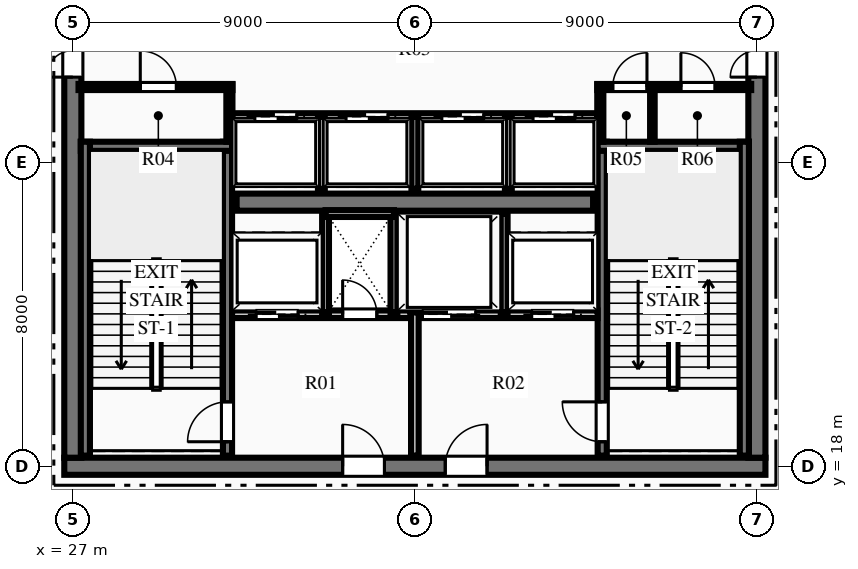
"""IFC4 building model, lengths in metres.
Left out: names, types, materials, properties, quantities, classifications, styles, units other than length and angle.
Written with IfcOpenShell. Run it as: python <this file> out.ifc"""

import sys

from ifc_helpers import new_model, si_unit, direction, frame, frame_2d, origin, place, context, subcontext, project, spatial, rectangle, extrude, element, fill, save


model = new_model("IFC4")
c1 = context("Model", 3, precision=1e-05, world=origin(), true_north=direction((0.0, 1.0)))
c2 = subcontext(c1, "Body", "Model", "MODEL_VIEW")
j1 = project(units=[si_unit("LENGTHUNIT", "METRE"), si_unit("PLANEANGLEUNIT", "RADIAN")], contexts=[c1])
p1 = place(None, origin())
s1 = spatial("IfcSite", under=j1, at=p1, CompositionType="ELEMENT")
p2 = place(p1, origin())
s2 = spatial("IfcBuilding", under=s1, at=p2, CompositionType="ELEMENT")
p3 = place(p2, frame((0.0, 0.0, 244.2)))
s3 = spatial("IfcBuildingStorey", under=s2, at=p3, CompositionType="ELEMENT", Elevation=244.2)
p4 = place(p3, frame((26.775, 18.0, 0.0), z_axis=(0.0, 0.0, 1.0), x_axis=(1.0, 0.0, 0.0)))
e1 = element("IfcWall", 1, at=p4, inside=s3, PredefinedType="SHEAR", context=c2, shape_type="SweptSolid", body=[
    extrude(rectangle(XDim=18.45, YDim=0.45, at=frame_2d((9.225, 0.0))), origin(), (0.0, 0.0, 1.0), 4.5),
])
p5 = place(p4, frame((7.325, 0.0, 0.0)))
e2 = element("IfcOpeningElement", 2, at=p5, cuts=e1, PredefinedType="OPENING", context=c2, shape_type="SweptSolid", body=[
    extrude(rectangle(XDim=1.1, YDim=2.15, at=frame_2d((0.55, 1.075))), frame((0.0, 0.235, 0.0), z_axis=(0.0, -1.0, 0.0), x_axis=(1.0, 0.0, 0.0)), (0.0, 0.0, 1.0), 0.47),
])
p6 = place(p4, frame((10.025, 0.0, 0.0)))
e3 = element("IfcOpeningElement", 3, at=p6, cuts=e1, PredefinedType="OPENING", context=c2, shape_type="SweptSolid", body=[
    extrude(rectangle(XDim=1.1, YDim=2.15, at=frame_2d((0.55, 1.075))), frame((0.0, 0.235, 0.0), z_axis=(0.0, -1.0, 0.0), x_axis=(1.0, 0.0, 0.0)), (0.0, 0.0, 1.0), 0.47),
])
p7 = place(p3, frame((27.0, 18.225, 0.0), z_axis=(0.0, 0.0, 1.0), x_axis=(0.0, 1.0, 0.0)))
e4 = element("IfcWall", 4, at=p7, inside=s3, PredefinedType="SHEAR", context=c2, shape_type="SweptSolid", body=[
    extrude(rectangle(XDim=15.55, YDim=0.45, at=frame_2d((7.775, 0.0))), origin(), (0.0, 0.0, 1.0), 4.5),
])
p8 = place(p7, frame((10.015, 0.0, 0.0)))
e5 = element("IfcOpeningElement", 5, at=p8, cuts=e4, PredefinedType="OPENING", context=c2, shape_type="SweptSolid", body=[
    extrude(rectangle(XDim=1.4, YDim=2.2, at=frame_2d((0.7, 1.1))), frame((0.0, 0.235, 0.0), z_axis=(0.0, -1.0, 0.0), x_axis=(1.0, 0.0, 0.0)), (0.0, 0.0, 1.0), 0.47),
])
p9 = place(p3, frame((45.0, 18.225, 0.0), z_axis=(0.0, 0.0, 1.0), x_axis=(0.0, 1.0, 0.0)))
e6 = element("IfcWall", 6, at=p9, inside=s3, PredefinedType="SHEAR", context=c2, shape_type="SweptSolid", body=[
    extrude(rectangle(XDim=15.55, YDim=0.45, at=frame_2d((7.775, 0.0))), origin(), (0.0, 0.0, 1.0), 4.5),
])
p10 = place(p9, frame((10.015, 0.0, 0.0)))
e7 = element("IfcOpeningElement", 7, at=p10, cuts=e6, PredefinedType="OPENING", context=c2, shape_type="SweptSolid", body=[
    extrude(rectangle(XDim=1.4, YDim=2.2, at=frame_2d((0.7, 1.1))), frame((0.0, 0.235, 0.0), z_axis=(0.0, -1.0, 0.0), x_axis=(1.0, 0.0, 0.0)), (0.0, 0.0, 1.0), 0.47),
])
p11 = place(p3, frame((31.31, 24.95, 0.0), z_axis=(0.0, 0.0, 1.0), x_axis=(1.0, 0.0, 0.0)))
e8 = element("IfcWall", 8, at=p11, inside=s3, PredefinedType="SHEAR", context=c2, shape_type="SweptSolid", body=[
    extrude(rectangle(XDim=9.38, YDim=0.45, at=frame_2d((4.69, 0.0))), origin(), (0.0, 0.0, 1.0), 4.5),
])
p12 = place(p3, frame((31.07, 18.28, 0.0), z_axis=(0.0, 0.0, 1.0), x_axis=(0.0, 1.0, 0.0)))
e9 = element("IfcWall", 9, at=p12, inside=s3, PredefinedType="SHEAR", context=c2, shape_type="SweptSolid", body=[
    extrude(rectangle(XDim=8.26, YDim=0.24, at=frame_2d((4.13, 0.0))), origin(), (0.0, 0.0, 1.0), 4.5),
])
p13 = place(p12, frame((0.365, 0.0, 0.0)))
e10 = element("IfcOpeningElement", 10, at=p13, cuts=e9, PredefinedType="OPENING", context=c2, shape_type="SweptSolid", body=[
    extrude(rectangle(XDim=1.05, YDim=2.15, at=frame_2d((0.525, 1.075))), frame((0.0, 0.13, 0.0), z_axis=(0.0, -1.0, 0.0), x_axis=(1.0, 0.0, 0.0)), (0.0, 0.0, 1.0), 0.26),
])
p14 = place(p3, frame((27.21, 26.42, 0.0), z_axis=(0.0, 0.0, 1.0), x_axis=(1.0, 0.0, 0.0)))
e11 = element("IfcWall", 11, at=p14, inside=s3, PredefinedType="SHEAR", context=c2, shape_type="SweptSolid", body=[
    extrude(rectangle(XDim=3.98, YDim=0.24, at=frame_2d((1.99, 0.0))), origin(), (0.0, 0.0, 1.0), 4.5),
])
p15 = place(p3, frame((27.33, 18.28, 0.0), z_axis=(0.0, 0.0, 1.0), x_axis=(0.0, 1.0, 0.0)))
e12 = element("IfcWall", 12, at=p15, inside=s3, PredefinedType="SHEAR", context=c2, shape_type="SweptSolid", body=[
    extrude(rectangle(XDim=8.26, YDim=0.24, at=frame_2d((4.13, 0.0))), origin(), (0.0, 0.0, 1.0), 4.5),
])
p16 = place(p3, frame((40.93, 18.28, 0.0), z_axis=(0.0, 0.0, 1.0), x_axis=(0.0, 1.0, 0.0)))
e13 = element("IfcWall", 13, at=p16, inside=s3, PredefinedType="SHEAR", context=c2, shape_type="SweptSolid", body=[
    extrude(rectangle(XDim=8.26, YDim=0.24, at=frame_2d((4.13, 0.0))), origin(), (0.0, 0.0, 1.0), 4.5),
])
p17 = place(p16, frame((0.365, 0.0, 0.0)))
e14 = element("IfcOpeningElement", 14, at=p17, cuts=e13, PredefinedType="OPENING", context=c2, shape_type="SweptSolid", body=[
    extrude(rectangle(XDim=1.05, YDim=2.15, at=frame_2d((0.525, 1.075))), frame((0.0, 0.13, 0.0), z_axis=(0.0, -1.0, 0.0), x_axis=(1.0, 0.0, 0.0)), (0.0, 0.0, 1.0), 0.26),
])
p18 = place(p3, frame((40.81, 26.42, 0.0), z_axis=(0.0, 0.0, 1.0), x_axis=(1.0, 0.0, 0.0)))
e15 = element("IfcWall", 15, at=p18, inside=s3, PredefinedType="SHEAR", context=c2, shape_type="SweptSolid", body=[
    extrude(rectangle(XDim=3.98, YDim=0.24, at=frame_2d((1.99, 0.0))), origin(), (0.0, 0.0, 1.0), 4.5),
])
p19 = place(p3, frame((44.67, 18.28, 0.0), z_axis=(0.0, 0.0, 1.0), x_axis=(0.0, 1.0, 0.0)))
e16 = element("IfcWall", 16, at=p19, inside=s3, PredefinedType="SHEAR", context=c2, shape_type="SweptSolid", body=[
    extrude(rectangle(XDim=8.26, YDim=0.24, at=frame_2d((4.13, 0.0))), origin(), (0.0, 0.0, 1.0), 4.5),
])
p20 = place(p3, frame((36.0, 18.28, 0.0), z_axis=(0.0, 0.0, 1.0), x_axis=(0.0, 1.0, 0.0)))
e17 = element("IfcWall", 17, at=p20, inside=s3, PredefinedType="PARTITIONING", context=c2, shape_type="SweptSolid", body=[
    extrude(rectangle(XDim=3.77, YDim=0.2, at=frame_2d((1.885, 0.0))), origin(), (0.0, 0.0, 1.0), 4.23),
])
p21 = place(p3, frame((31.19, 22.0, 0.0), z_axis=(0.0, 0.0, 1.0), x_axis=(1.0, 0.0, 0.0)))
e18 = element("IfcWall", 18, at=p21, inside=s3, PredefinedType="PARTITIONING", context=c2, shape_type="SweptSolid", body=[
    extrude(rectangle(XDim=4.69, YDim=0.2, at=frame_2d((2.345, 0.0))), origin(), (0.0, 0.0, 1.0), 4.23),
])
p22 = place(p21, frame((2.91, 0.0, 0.0)))
e19 = element("IfcOpeningElement", 19, at=p22, cuts=e18, PredefinedType="OPENING", context=c2, shape_type="SweptSolid", body=[
    extrude(rectangle(XDim=0.9, YDim=2.15, at=frame_2d((0.45, 1.075))), frame((0.0, 0.11, 0.0), z_axis=(0.0, -1.0, 0.0), x_axis=(1.0, 0.0, 0.0)), (0.0, 0.0, 1.0), 0.22),
])
p23 = place(p21, frame((0.635, 0.0, 0.0)))
e20 = element("IfcOpeningElement", 20, at=p23, cuts=e18, PredefinedType="OPENING", context=c2, shape_type="SweptSolid", body=[
    extrude(rectangle(XDim=1.1, YDim=2.15, at=frame_2d((0.55, 1.075))), frame((0.0, 0.11, 0.0), z_axis=(0.0, -1.0, 0.0), x_axis=(1.0, 0.0, 0.0)), (0.0, 0.0, 1.0), 0.22),
])
p24 = place(p3, frame((36.12, 22.0, 0.0), z_axis=(0.0, 0.0, 1.0), x_axis=(1.0, 0.0, 0.0)))
e21 = element("IfcWall", 21, at=p24, inside=s3, PredefinedType="PARTITIONING", context=c2, shape_type="SweptSolid", body=[
    extrude(rectangle(XDim=4.69, YDim=0.2, at=frame_2d((2.345, 0.0))), origin(), (0.0, 0.0, 1.0), 4.23),
])
p25 = place(p24, frame((2.955, 0.0, 0.0)))
e22 = element("IfcOpeningElement", 22, at=p25, cuts=e21, PredefinedType="OPENING", context=c2, shape_type="SweptSolid", body=[
    extrude(rectangle(XDim=1.1, YDim=2.15, at=frame_2d((0.55, 1.075))), frame((0.0, 0.11, 0.0), z_axis=(0.0, -1.0, 0.0), x_axis=(1.0, 0.0, 0.0)), (0.0, 0.0, 1.0), 0.22),
])
p26 = place(p24, frame((0.08, 0.0, 0.0)))
e23 = element("IfcOpeningElement", 23, at=p26, cuts=e21, PredefinedType="OPENING", context=c2, shape_type="SweptSolid", body=[
    extrude(rectangle(XDim=1.4, YDim=2.2, at=frame_2d((0.7, 1.1))), frame((0.0, 0.11, 0.0), z_axis=(0.0, -1.0, 0.0), x_axis=(1.0, 0.0, 0.0)), (0.0, 0.0, 1.0), 0.22),
])
for number, where, z_axis, x_axis in (
    (24, (33.65, 22.05, 0.0), (0.0, 0.0, 1.0), (0.0, 1.0, 0.0)),
    (25, (35.45, 22.05, 0.0), (0.0, 0.0, 1.0), (0.0, 1.0, 0.0)),
):
    element("IfcWall", number, at=place(p3, frame(where, z_axis=z_axis, x_axis=x_axis)), inside=s3, PredefinedType="PARTITIONING", context=c2, shape_type="SweptSolid", body=[
        extrude(rectangle(XDim=2.6, YDim=0.18, at=frame_2d((1.3, 0.0))), origin(), (0.0, 0.0, 1.0), 4.23),
    ])
p27 = place(p3, frame((33.65, 24.65, 0.0), z_axis=(0.0, 0.0, 1.0), x_axis=(1.0, 0.0, 0.0)))
e26 = element("IfcWall", 26, at=p27, inside=s3, PredefinedType="PARTITIONING", context=c2, shape_type="SweptSolid", body=[
    extrude(rectangle(XDim=1.8, YDim=0.18, at=frame_2d((0.9, 0.0))), origin(), (0.0, 0.0, 1.0), 4.23),
])
p28 = place(p3, frame((38.35, 22.05, 0.0), z_axis=(0.0, 0.0, 1.0), x_axis=(0.0, 1.0, 0.0)))
e27 = element("IfcWall", 27, at=p28, inside=s3, PredefinedType="PARTITIONING", context=c2, shape_type="SweptSolid", body=[
    extrude(rectangle(XDim=2.6, YDim=0.18, at=frame_2d((1.3, 0.0))), origin(), (0.0, 0.0, 1.0), 4.23),
])
p29 = place(p3, frame((27.15, 27.98, 0.0), z_axis=(0.0, 0.0, 1.0), x_axis=(1.0, 0.0, 0.0)))
e28 = element("IfcWall", 28, at=p29, inside=s3, PredefinedType="PARTITIONING", context=c2, shape_type="SweptSolid", body=[
    extrude(rectangle(XDim=4.05, YDim=0.16, at=frame_2d((2.025, 0.0))), origin(), (0.0, 0.0, 1.0), 4.23),
])
p30 = place(p29, frame((1.625, 0.0, 0.0)))
e29 = element("IfcOpeningElement", 29, at=p30, cuts=e28, PredefinedType="OPENING", context=c2, shape_type="SweptSolid", body=[
    extrude(rectangle(XDim=0.95, YDim=2.15, at=frame_2d((0.475, 1.075))), frame((0.0, 0.09, 0.0), z_axis=(0.0, -1.0, 0.0), x_axis=(1.0, 0.0, 0.0)), (0.0, 0.0, 1.0), 0.18),
])
p31 = place(p3, frame((31.12, 26.54, 0.0), z_axis=(0.0, 0.0, 1.0), x_axis=(0.0, 1.0, 0.0)))
e30 = element("IfcWall", 30, at=p31, inside=s3, PredefinedType="PARTITIONING", context=c2, shape_type="SweptSolid", body=[
    extrude(rectangle(XDim=1.51, YDim=0.16, at=frame_2d((0.755, 0.0))), origin(), (0.0, 0.0, 1.0), 4.23),
])
p32 = place(p3, frame((40.8, 27.98, 0.0), z_axis=(0.0, 0.0, 1.0), x_axis=(1.0, 0.0, 0.0)))
e31 = element("IfcWall", 31, at=p32, inside=s3, PredefinedType="PARTITIONING", context=c2, shape_type="SweptSolid", body=[
    extrude(rectangle(XDim=4.05, YDim=0.16, at=frame_2d((2.025, 0.0))), origin(), (0.0, 0.0, 1.0), 4.23),
])
p33 = place(p32, frame((0.407, 0.0, 0.0)))
e32 = element("IfcOpeningElement", 32, at=p33, cuts=e31, PredefinedType="OPENING", context=c2, shape_type="SweptSolid", body=[
    extrude(rectangle(XDim=0.9, YDim=2.15, at=frame_2d((0.45, 1.075))), frame((0.0, 0.09, 0.0), z_axis=(0.0, -1.0, 0.0), x_axis=(1.0, 0.0, 0.0)), (0.0, 0.0, 1.0), 0.18),
])
p34 = place(p32, frame((2.2, 0.0, 0.0)))
e33 = element("IfcOpeningElement", 33, at=p34, cuts=e31, PredefinedType="OPENING", context=c2, shape_type="SweptSolid", body=[
    extrude(rectangle(XDim=0.9, YDim=2.15, at=frame_2d((0.45, 1.075))), frame((0.0, 0.09, 0.0), z_axis=(0.0, -1.0, 0.0), x_axis=(1.0, 0.0, 0.0)), (0.0, 0.0, 1.0), 0.18),
])
p35 = place(p3, frame((40.88, 26.54, 0.0), z_axis=(0.0, 0.0, 1.0), x_axis=(0.0, 1.0, 0.0)))
e34 = element("IfcWall", 34, at=p35, inside=s3, PredefinedType="PARTITIONING", context=c2, shape_type="SweptSolid", body=[
    extrude(rectangle(XDim=1.51, YDim=0.16, at=frame_2d((0.755, 0.0))), origin(), (0.0, 0.0, 1.0), 4.23),
])
p36 = place(p3, frame((42.25, 26.54, 0.0), z_axis=(0.0, 0.0, 1.0), x_axis=(0.0, 1.0, 0.0)))
e35 = element("IfcWall", 35, at=p36, inside=s3, PredefinedType="PARTITIONING", context=c2, shape_type="SweptSolid", body=[
    extrude(rectangle(XDim=1.44, YDim=0.12, at=frame_2d((0.72, 0.0))), origin(), (0.0, 0.0, 1.0), 4.23),
])
p37 = place(p3, frame((31.2, 27.2, 0.0), z_axis=(0.0, 0.0, 1.0), x_axis=(1.0, 0.0, 0.0)))
e36 = element("IfcWall", 36, at=p37, inside=s3, PredefinedType="PARTITIONING", context=c2, shape_type="SweptSolid", body=[
    extrude(rectangle(XDim=9.6, YDim=0.18, at=frame_2d((4.8, 0.0))), origin(), (0.0, 0.0, 1.0), 4.23),
])
p38 = place(p37, frame((0.59, 0.0, 0.0)))
e37 = element("IfcOpeningElement", 37, at=p38, cuts=e36, PredefinedType="OPENING", context=c2, shape_type="SweptSolid", body=[
    extrude(rectangle(XDim=1.1, YDim=2.15, at=frame_2d((0.55, 1.075))), frame((0.0, 0.1, 0.0), z_axis=(0.0, -1.0, 0.0), x_axis=(1.0, 0.0, 0.0)), (0.0, 0.0, 1.0), 0.2),
])
p39 = place(p37, frame((2.99, 0.0, 0.0)))
e38 = element("IfcOpeningElement", 38, at=p39, cuts=e36, PredefinedType="OPENING", context=c2, shape_type="SweptSolid", body=[
    extrude(rectangle(XDim=1.1, YDim=2.15, at=frame_2d((0.55, 1.075))), frame((0.0, 0.1, 0.0), z_axis=(0.0, -1.0, 0.0), x_axis=(1.0, 0.0, 0.0)), (0.0, 0.0, 1.0), 0.2),
])
p40 = place(p37, frame((5.51, 0.0, 0.0)))
e39 = element("IfcOpeningElement", 39, at=p40, cuts=e36, PredefinedType="OPENING", context=c2, shape_type="SweptSolid", body=[
    extrude(rectangle(XDim=1.1, YDim=2.15, at=frame_2d((0.55, 1.075))), frame((0.0, 0.1, 0.0), z_axis=(0.0, -1.0, 0.0), x_axis=(1.0, 0.0, 0.0)), (0.0, 0.0, 1.0), 0.2),
])
p41 = place(p37, frame((7.91, 0.0, 0.0)))
e40 = element("IfcOpeningElement", 40, at=p41, cuts=e36, PredefinedType="OPENING", context=c2, shape_type="SweptSolid", body=[
    extrude(rectangle(XDim=1.1, YDim=2.15, at=frame_2d((0.55, 1.075))), frame((0.0, 0.1, 0.0), z_axis=(0.0, -1.0, 0.0), x_axis=(1.0, 0.0, 0.0)), (0.0, 0.0, 1.0), 0.2),
])
for number, where, z_axis, x_axis in (
    (41, (33.54, 25.3, 0.0), (0.0, 0.0, 1.0), (0.0, 1.0, 0.0)),
    (42, (36.0, 25.3, 0.0), (0.0, 0.0, 1.0), (0.0, 1.0, 0.0)),
    (43, (38.46, 25.3, 0.0), (0.0, 0.0, 1.0), (0.0, 1.0, 0.0)),
):
    element("IfcWall", number, at=place(p3, frame(where, z_axis=z_axis, x_axis=x_axis)), inside=s3, PredefinedType="PARTITIONING", context=c2, shape_type="SweptSolid", body=[
        extrude(rectangle(XDim=1.9, YDim=0.18, at=frame_2d((0.95, 0.0))), origin(), (0.0, 0.0, 1.0), 4.23),
    ])
p42 = place(p30, origin())
e44 = element("IfcDoor", 44, at=p42, inside=s3, OperationType="SINGLE_SWING_LEFT", PredefinedType="DOOR", context=c2, shape_type="SweptSolid", body=[
    extrude(rectangle(XDim=0.95, YDim=2.15, at=frame_2d((0.475, 1.075))), frame((0.0, 0.025, 0.0), z_axis=(0.0, -1.0, 0.0), x_axis=(1.0, 0.0, 0.0)), (0.0, 0.0, 1.0), 0.05),
])
fill(e29, e44)
p43 = place(p33, origin())
e45 = element("IfcDoor", 45, at=p43, inside=s3, OperationType="SINGLE_SWING_RIGHT", PredefinedType="DOOR", context=c2, shape_type="SweptSolid", body=[
    extrude(rectangle(XDim=0.9, YDim=2.15, at=frame_2d((0.45, 1.075))), frame((0.0, 0.025, 0.0), z_axis=(0.0, -1.0, 0.0), x_axis=(1.0, 0.0, 0.0)), (0.0, 0.0, 1.0), 0.05),
])
fill(e32, e45)
p44 = place(p34, origin())
e46 = element("IfcDoor", 46, at=p44, inside=s3, OperationType="SINGLE_SWING_LEFT", PredefinedType="DOOR", context=c2, shape_type="SweptSolid", body=[
    extrude(rectangle(XDim=0.9, YDim=2.15, at=frame_2d((0.45, 1.075))), frame((0.0, 0.025, 0.0), z_axis=(0.0, -1.0, 0.0), x_axis=(1.0, 0.0, 0.0)), (0.0, 0.0, 1.0), 0.05),
])
fill(e33, e46)
p45 = place(p13, origin())
e47 = element("IfcDoor", 47, at=p45, inside=s3, OperationType="SINGLE_SWING_LEFT", PredefinedType="DOOR", context=c2, shape_type="SweptSolid", body=[
    extrude(rectangle(XDim=1.05, YDim=2.15, at=frame_2d((0.525, 1.075))), frame((0.0, 0.025, 0.0), z_axis=(0.0, -1.0, 0.0), x_axis=(1.0, 0.0, 0.0)), (0.0, 0.0, 1.0), 0.05),
])
fill(e10, e47)
p46 = place(p17, origin())
e48 = element("IfcDoor", 48, at=p46, inside=s3, OperationType="SINGLE_SWING_RIGHT", PredefinedType="DOOR", context=c2, shape_type="SweptSolid", body=[
    extrude(rectangle(XDim=1.05, YDim=2.15, at=frame_2d((0.525, 1.075))), frame((0.0, 0.025, 0.0), z_axis=(0.0, -1.0, 0.0), x_axis=(1.0, 0.0, 0.0)), (0.0, 0.0, 1.0), 0.05),
])
fill(e14, e48)
p47 = place(p5, origin())
e49 = element("IfcDoor", 49, at=p47, inside=s3, OperationType="SINGLE_SWING_LEFT", PredefinedType="DOOR", context=c2, shape_type="SweptSolid", body=[
    extrude(rectangle(XDim=1.1, YDim=2.15, at=frame_2d((0.55, 1.075))), frame((0.0, 0.025, 0.0), z_axis=(0.0, -1.0, 0.0), x_axis=(1.0, 0.0, 0.0)), (0.0, 0.0, 1.0), 0.05),
])
fill(e2, e49)
p48 = place(p6, origin())
e50 = element("IfcDoor", 50, at=p48, inside=s3, OperationType="SINGLE_SWING_RIGHT", PredefinedType="DOOR", context=c2, shape_type="SweptSolid", body=[
    extrude(rectangle(XDim=1.1, YDim=2.15, at=frame_2d((0.55, 1.075))), frame((0.0, 0.025, 0.0), z_axis=(0.0, -1.0, 0.0), x_axis=(1.0, 0.0, 0.0)), (0.0, 0.0, 1.0), 0.05),
])
fill(e3, e50)
p49 = place(p22, origin())
e51 = element("IfcDoor", 51, at=p49, inside=s3, OperationType="SINGLE_SWING_LEFT", PredefinedType="DOOR", context=c2, shape_type="SweptSolid", body=[
    extrude(rectangle(XDim=0.9, YDim=2.15, at=frame_2d((0.45, 1.075))), frame((0.0, 0.025, 0.0), z_axis=(0.0, -1.0, 0.0), x_axis=(1.0, 0.0, 0.0)), (0.0, 0.0, 1.0), 0.05),
])
fill(e19, e51)
p50 = place(p8, origin())
e52 = element("IfcDoor", 52, at=p50, inside=s3, OperationType="DOUBLE_DOOR_SINGLE_SWING", PredefinedType="DOOR", context=c2, shape_type="SweptSolid", body=[
    extrude(rectangle(XDim=1.4, YDim=2.2, at=frame_2d((0.7, 1.1))), frame((0.0, 0.025, 0.0), z_axis=(0.0, -1.0, 0.0), x_axis=(1.0, 0.0, 0.0)), (0.0, 0.0, 1.0), 0.05),
])
fill(e5, e52)
p51 = place(p10, origin())
e53 = element("IfcDoor", 53, at=p51, inside=s3, OperationType="DOUBLE_DOOR_SINGLE_SWING", PredefinedType="DOOR", context=c2, shape_type="SweptSolid", body=[
    extrude(rectangle(XDim=1.4, YDim=2.2, at=frame_2d((0.7, 1.1))), frame((0.0, 0.025, 0.0), z_axis=(0.0, -1.0, 0.0), x_axis=(1.0, 0.0, 0.0)), (0.0, 0.0, 1.0), 0.05),
])
fill(e7, e53)
p52 = place(p38, origin())
e54 = element("IfcDoor", 54, at=p52, inside=s3, OperationType="SLIDING_TO_LEFT", PredefinedType="DOOR", context=c2, shape_type="SweptSolid", body=[
    extrude(rectangle(XDim=1.1, YDim=2.15, at=frame_2d((0.55, 1.075))), frame((0.0, 0.025, 0.0), z_axis=(0.0, -1.0, 0.0), x_axis=(1.0, 0.0, 0.0)), (0.0, 0.0, 1.0), 0.05),
])
fill(e37, e54)
p53 = place(p39, origin())
e55 = element("IfcDoor", 55, at=p53, inside=s3, OperationType="SLIDING_TO_LEFT", PredefinedType="DOOR", context=c2, shape_type="SweptSolid", body=[
    extrude(rectangle(XDim=1.1, YDim=2.15, at=frame_2d((0.55, 1.075))), frame((0.0, 0.025, 0.0), z_axis=(0.0, -1.0, 0.0), x_axis=(1.0, 0.0, 0.0)), (0.0, 0.0, 1.0), 0.05),
])
fill(e38, e55)
p54 = place(p40, origin())
e56 = element("IfcDoor", 56, at=p54, inside=s3, OperationType="SLIDING_TO_LEFT", PredefinedType="DOOR", context=c2, shape_type="SweptSolid", body=[
    extrude(rectangle(XDim=1.1, YDim=2.15, at=frame_2d((0.55, 1.075))), frame((0.0, 0.025, 0.0), z_axis=(0.0, -1.0, 0.0), x_axis=(1.0, 0.0, 0.0)), (0.0, 0.0, 1.0), 0.05),
])
fill(e39, e56)
p55 = place(p41, origin())
e57 = element("IfcDoor", 57, at=p55, inside=s3, OperationType="SLIDING_TO_LEFT", PredefinedType="DOOR", context=c2, shape_type="SweptSolid", body=[
    extrude(rectangle(XDim=1.1, YDim=2.15, at=frame_2d((0.55, 1.075))), frame((0.0, 0.025, 0.0), z_axis=(0.0, -1.0, 0.0), x_axis=(1.0, 0.0, 0.0)), (0.0, 0.0, 1.0), 0.05),
])
fill(e40, e57)
p56 = place(p23, origin())
e58 = element("IfcDoor", 58, at=p56, inside=s3, OperationType="SLIDING_TO_LEFT", PredefinedType="DOOR", context=c2, shape_type="SweptSolid", body=[
    extrude(rectangle(XDim=1.1, YDim=2.15, at=frame_2d((0.55, 1.075))), frame((0.0, 0.025, 0.0), z_axis=(0.0, -1.0, 0.0), x_axis=(1.0, 0.0, 0.0)), (0.0, 0.0, 1.0), 0.05),
])
fill(e20, e58)
p57 = place(p25, origin())
e59 = element("IfcDoor", 59, at=p57, inside=s3, OperationType="SLIDING_TO_LEFT", PredefinedType="DOOR", context=c2, shape_type="SweptSolid", body=[
    extrude(rectangle(XDim=1.1, YDim=2.15, at=frame_2d((0.55, 1.075))), frame((0.0, 0.025, 0.0), z_axis=(0.0, -1.0, 0.0), x_axis=(1.0, 0.0, 0.0)), (0.0, 0.0, 1.0), 0.05),
])
fill(e22, e59)
p58 = place(p26, origin())
e60 = element("IfcDoor", 60, at=p58, inside=s3, OperationType="SLIDING_TO_LEFT", PredefinedType="DOOR", context=c2, shape_type="SweptSolid", body=[
    extrude(rectangle(XDim=1.4, YDim=2.2, at=frame_2d((0.7, 1.1))), frame((0.0, 0.025, 0.0), z_axis=(0.0, -1.0, 0.0), x_axis=(1.0, 0.0, 0.0)), (0.0, 0.0, 1.0), 0.05),
])
fill(e23, e60)
save(model, sys.argv[1])
